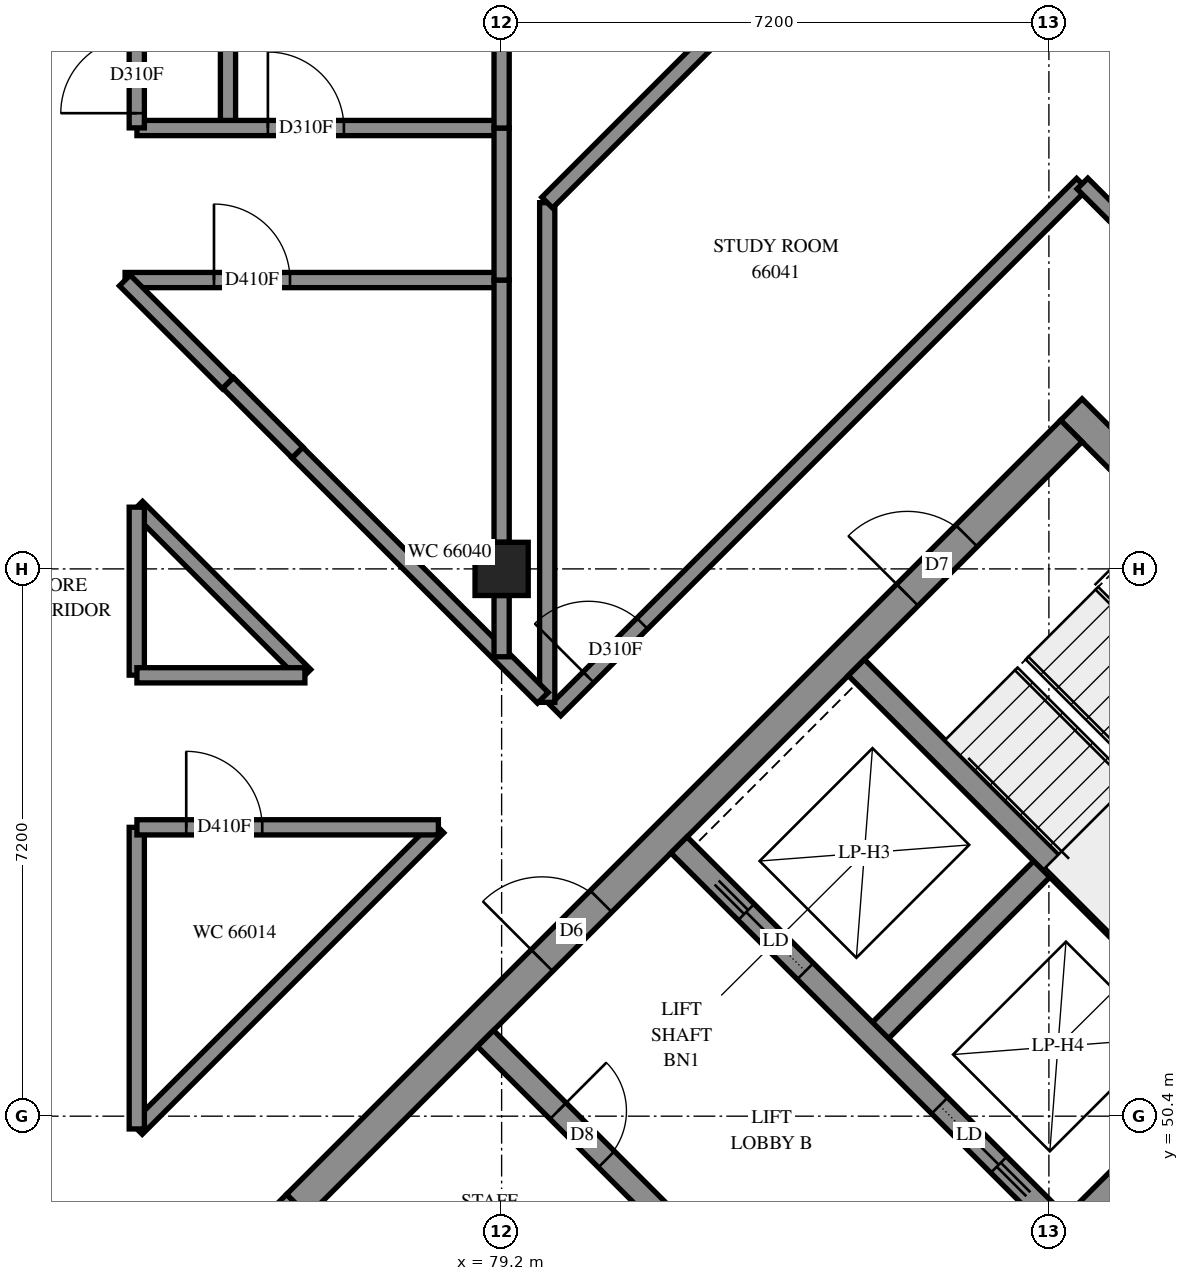
"""IFC4 building model, lengths in metres.
Left out: names, types, materials, properties, quantities, classifications, styles, units other than length and angle.
Written with IfcOpenShell. Run it as: python <this file> out.ifc"""

import sys

from ifc_helpers import new_model, si_unit, direction, frame, frame_2d, origin, origin_2d, place, context, subcontext, project, spatial, polyline, rectangle, outline, extrude, element, fill, save


model = new_model("IFC4")
c1 = context("Model", 3, precision=1e-05, world=origin(), true_north=direction((0.0, 1.0)))
c2 = subcontext(c1, "Body", "Model", "MODEL_VIEW")
j1 = project(units=[si_unit("LENGTHUNIT", "METRE"), si_unit("PLANEANGLEUNIT", "RADIAN")], contexts=[c1])
p1 = place(None, origin())
s1 = spatial("IfcSite", under=j1, at=p1, CompositionType="ELEMENT")
p2 = place(p1, origin())
s2 = spatial("IfcBuilding", under=s1, at=p2, CompositionType="ELEMENT")
p3 = place(p2, frame((0.0, 0.0, 243.8)))
s3 = spatial("IfcBuildingStorey", under=s2, at=p3, CompositionType="ELEMENT", Elevation=243.8)
p4 = place(p3, frame((79.2, 57.6, 0.0), z_axis=(0.0, 0.0, 1.0), x_axis=(1.0, 0.0, 0.0)))
e1 = element("IfcColumn", 1, at=p4, inside=s3, PredefinedType="COLUMN", context=c2, shape_type="SweptSolid", body=[
    extrude(rectangle(XDim=0.7, YDim=0.7, at=origin_2d()), origin(), (0.0, 0.0, 1.0), 3.1),
])
p5 = place(p3, frame((76.23, 49.231, -0.3), z_axis=(0.0, 0.0, 1.0), x_axis=(0.7071034917, -0.7071100706, 0.0)))
e2 = element("IfcWall", 2, at=p5, inside=s3, PredefinedType="SHEAR", context=c2, shape_type="SweptSolid", body=[
    extrude(rectangle(XDim=15.2, YDim=0.4, at=frame_2d((7.6, 0.0))), origin(), (0.0, 0.0, 1.0), 2.7),
])
p6 = place(p3, frame((86.695, 59.696, -0.3), z_axis=(0.0, 0.0, 1.0), x_axis=(0.7071100706, -0.7071034917, 0.0)))
e3 = element("IfcWall", 3, at=p6, inside=s3, PredefinedType="SHEAR", context=c2, shape_type="SweptSolid", body=[
    extrude(rectangle(XDim=15.2, YDim=0.4, at=frame_2d((7.6, 0.0))), origin(), (0.0, 0.0, 1.0), 2.7),
])
p7 = place(p6, frame((10.4, 0.0, 0.3)))
e4 = element("IfcOpeningElement", 4, at=p7, cuts=e3, PredefinedType="OPENING", context=c2, shape_type="SweptSolid", body=[
    extrude(rectangle(XDim=0.8, YDim=2.1, at=frame_2d((0.4, 1.05))), frame((0.0, 0.21, 0.0), z_axis=(0.0, -1.0, 0.0), x_axis=(1.0, 0.0, 0.0)), (0.0, 0.0, 1.0), 0.42),
])
p8 = place(p3, frame((76.513, 49.231, -0.3), z_axis=(0.0, 0.0, 1.0), x_axis=(0.7071067812, 0.7071067812, 0.0)))
e5 = element("IfcWall", 5, at=p8, inside=s3, PredefinedType="SHEAR", context=c2, shape_type="SweptSolid", body=[
    extrude(rectangle(XDim=14.4, YDim=0.4, at=frame_2d((7.2, 0.0))), origin(), (0.0, 0.0, 1.0), 2.7),
])
p9 = place(p8, frame((4.55, 0.0, 0.3)))
e6 = element("IfcOpeningElement", 6, at=p9, cuts=e5, PredefinedType="OPENING", context=c2, shape_type="SweptSolid", body=[
    extrude(rectangle(XDim=1.1, YDim=2.1, at=frame_2d((0.55, 1.05))), frame((0.0, 0.21, 0.0), z_axis=(0.0, -1.0, 0.0), x_axis=(1.0, 0.0, 0.0)), (0.0, 0.0, 1.0), 0.42),
])
p10 = place(p8, frame((11.35, 0.0, 0.3)))
e7 = element("IfcOpeningElement", 7, at=p10, cuts=e5, PredefinedType="OPENING", context=c2, shape_type="SweptSolid", body=[
    extrude(rectangle(XDim=1.1, YDim=2.1, at=frame_2d((0.55, 1.05))), frame((0.0, 0.21, 0.0), z_axis=(0.0, -1.0, 0.0), x_axis=(1.0, 0.0, 0.0)), (0.0, 0.0, 1.0), 0.42),
])
p11 = place(p3, frame((84.079, 51.423, 0.0), z_axis=(0.0, 0.0, 1.0), x_axis=(0.7071219326, 0.7070916295, 0.0)))
e8 = element("IfcWall", 8, at=p11, inside=s3, PredefinedType="SOLIDWALL", context=c2, shape_type="SweptSolid", body=[
    extrude(rectangle(XDim=3.3, YDim=0.3, at=frame_2d((1.65, 0.0))), origin(), (0.0, 0.0, 1.0), 3.1),
])
p12 = place(p3, frame((86.625, 48.878, 0.0), z_axis=(0.0, 0.0, 1.0), x_axis=(0.7071067812, 0.7071067812, 0.0)))
e9 = element("IfcWall", 9, at=p12, inside=s3, PredefinedType="SOLIDWALL", context=c2, shape_type="SweptSolid", body=[
    extrude(rectangle(XDim=3.3, YDim=0.3, at=frame_2d((1.65, 0.0))), origin(), (0.0, 0.0, 1.0), 3.1),
])
p13 = place(p3, frame((78.988, 51.423, 0.0), z_axis=(0.0, 0.0, 1.0), x_axis=(0.7071067812, -0.7071067812, 0.0)))
e10 = element("IfcWall", 10, at=p13, inside=s3, PredefinedType="SOLIDWALL", context=c2, shape_type="SweptSolid", body=[
    extrude(rectangle(XDim=14.4, YDim=0.3, at=frame_2d((7.2, 0.0))), origin(), (0.0, 0.0, 1.0), 3.1),
])
p14 = place(p13, frame((1.35, 0.0, 0.0)))
e11 = element("IfcOpeningElement", 11, at=p14, cuts=e10, PredefinedType="OPENING", context=c2, shape_type="SweptSolid", body=[
    extrude(rectangle(XDim=0.9, YDim=2.1, at=frame_2d((0.45, 1.05))), frame((0.0, 0.16, 0.0), z_axis=(0.0, -1.0, 0.0), x_axis=(1.0, 0.0, 0.0)), (0.0, 0.0, 1.0), 0.32),
])
p15 = place(p13, frame((4.95, 0.0, 0.0)))
e12 = element("IfcOpeningElement", 12, at=p15, cuts=e10, PredefinedType="OPENING", context=c2, shape_type="SweptSolid", body=[
    extrude(rectangle(XDim=0.9, YDim=2.1, at=frame_2d((0.45, 1.05))), frame((0.0, 0.16, 0.0), z_axis=(0.0, -1.0, 0.0), x_axis=(1.0, 0.0, 0.0)), (0.0, 0.0, 1.0), 0.32),
])
p16 = place(p13, frame((8.55, 0.0, 0.0)))
e13 = element("IfcOpeningElement", 13, at=p16, cuts=e10, PredefinedType="OPENING", context=c2, shape_type="SweptSolid", body=[
    extrude(rectangle(XDim=0.9, YDim=2.1, at=frame_2d((0.45, 1.05))), frame((0.0, 0.16, 0.0), z_axis=(0.0, -1.0, 0.0), x_axis=(1.0, 0.0, 0.0)), (0.0, 0.0, 1.0), 0.32),
])
p17 = place(p13, frame((12.05, 0.0, 0.0)))
e14 = element("IfcOpeningElement", 14, at=p17, cuts=e10, PredefinedType="OPENING", context=c2, shape_type="SweptSolid", body=[
    extrude(rectangle(XDim=1.1, YDim=2.1, at=frame_2d((0.55, 1.05))), frame((0.0, 0.16, 0.0), z_axis=(0.0, -1.0, 0.0), x_axis=(1.0, 0.0, 0.0)), (0.0, 0.0, 1.0), 0.32),
])
p18 = place(p3, frame((81.534, 53.969, 0.0), z_axis=(0.0, 0.0, 1.0), x_axis=(0.707103309, -0.7071102534, 0.0)))
e15 = element("IfcWall", 15, at=p18, inside=s3, PredefinedType="SOLIDWALL", context=c2, shape_type="SweptSolid", body=[
    extrude(rectangle(XDim=14.4, YDim=0.3, at=frame_2d((7.2, 0.0))), origin(), (0.0, 0.0, 1.0), 3.1),
])
p19 = place(p18, frame((8.55, 0.0, 0.0)))
e16 = element("IfcOpeningElement", 16, at=p19, cuts=e15, PredefinedType="OPENING", context=c2, shape_type="SweptSolid", body=[
    extrude(rectangle(XDim=0.9, YDim=2.1, at=frame_2d((0.45, 1.05))), frame((0.0, 0.16, 0.0), z_axis=(0.0, -1.0, 0.0), x_axis=(1.0, 0.0, 0.0)), (0.0, 0.0, 1.0), 0.32),
])
p20 = place(p18, frame((1.25, 0.0, 0.0)))
e17 = element("IfcOpeningElement", 17, at=p20, cuts=e15, PredefinedType="OPENING", context=c2, shape_type="SweptSolid", body=[
    extrude(rectangle(XDim=1.1, YDim=2.1, at=frame_2d((0.55, 1.05))), frame((0.0, 0.16, 0.0), z_axis=(0.0, -1.0, 0.0), x_axis=(1.0, 0.0, 0.0)), (0.0, 0.0, 1.0), 0.32),
])
p21 = place(p18, frame((4.85, 0.0, 0.0)))
e18 = element("IfcOpeningElement", 18, at=p21, cuts=e15, PredefinedType="OPENING", context=c2, shape_type="SweptSolid", body=[
    extrude(rectangle(XDim=1.1, YDim=2.1, at=frame_2d((0.55, 1.05))), frame((0.0, 0.16, 0.0), z_axis=(0.0, -1.0, 0.0), x_axis=(1.0, 0.0, 0.0)), (0.0, 0.0, 1.0), 0.32),
])
p22 = place(p18, frame((12.05, 0.0, 0.0)))
e19 = element("IfcOpeningElement", 19, at=p22, cuts=e15, PredefinedType="OPENING", context=c2, shape_type="SweptSolid", body=[
    extrude(rectangle(XDim=1.1, YDim=2.1, at=frame_2d((0.55, 1.05))), frame((0.0, 0.16, 0.0), z_axis=(0.0, -1.0, 0.0), x_axis=(1.0, 0.0, 0.0)), (0.0, 0.0, 1.0), 0.32),
])
p23 = place(p3, frame((83.867, 56.302, 0.0), z_axis=(0.0, 0.0, 1.0), x_axis=(0.7071137256, -0.7070998367, 0.0)))
e20 = element("IfcWall", 20, at=p23, inside=s3, PredefinedType="SOLIDWALL", context=c2, shape_type="SweptSolid", body=[
    extrude(rectangle(XDim=7.2, YDim=0.3, at=frame_2d((3.6, 0.0))), origin(), (0.0, 0.0, 1.0), 3.1),
])
p24 = place(p3, frame((88.896, 64.106, 0.0), z_axis=(0.0, 0.0, 1.0), x_axis=(-0.7677573222, 0.6407407387, 0.0)))
e21 = element("IfcWall", 21, at=p24, inside=s3, PredefinedType="SOLIDWALL", context=c2, shape_type="SweptSolid", body=[
    extrude(outline(polyline([(-0.02, -0.225), (3.32, -0.225), (3.361, 0.225), (0.02, 0.225), (-0.02, -0.225)])), origin(), (0.0, 0.0, 1.0), 3.1),
])
p25 = place(p24, frame((0.333, 0.0, 0.45)))
e22 = element("IfcOpeningElement", 22, at=p25, cuts=e21, PredefinedType="OPENING", context=c2, shape_type="SweptSolid", body=[
    extrude(rectangle(XDim=1.2, YDim=2.55, at=frame_2d((0.6, 1.275))), frame((0.0, 0.235, 0.0), z_axis=(0.0, -1.0, 0.0), x_axis=(1.0, 0.0, 0.0)), (0.0, 0.0, 1.0), 0.47),
])
p26 = place(p24, frame((1.793, 0.0, 0.45)))
e23 = element("IfcOpeningElement", 23, at=p26, cuts=e21, PredefinedType="OPENING", context=c2, shape_type="SweptSolid", body=[
    extrude(rectangle(XDim=1.2, YDim=2.55, at=frame_2d((0.6, 1.275))), frame((0.0, 0.235, 0.0), z_axis=(0.0, -1.0, 0.0), x_axis=(1.0, 0.0, 0.0)), (0.0, 0.0, 1.0), 0.47),
])
p27 = place(p3, frame((79.907, 55.739, 0.0), z_axis=(0.0, 0.0, 1.0), x_axis=(0.7071067812, 0.7071067812, 0.0)))
e24 = element("IfcWall", 24, at=p27, inside=s3, PredefinedType="PARTITIONING", context=c2, shape_type="SweptSolid", body=[
    extrude(rectangle(XDim=9.798, YDim=0.2, at=frame_2d((4.899, 0.0))), origin(), (0.0, 0.0, 1.0), 3.1),
])
p28 = place(p27, frame((0.616, 0.0, 0.0)))
e25 = element("IfcOpeningElement", 25, at=p28, cuts=e24, PredefinedType="OPENING", context=c2, shape_type="SweptSolid", body=[
    extrude(rectangle(XDim=1.0, YDim=2.1, at=frame_2d((0.5, 1.05))), frame((0.0, 0.11, 0.0), z_axis=(0.0, -1.0, 0.0), x_axis=(1.0, 0.0, 0.0)), (0.0, 0.0, 1.0), 0.22),
])
p29 = place(p3, frame((75.6, 63.4, 0.0), z_axis=(0.0, 0.0, 1.0), x_axis=(0.0, 1.0, 0.0)))
e26 = element("IfcWall", 26, at=p29, inside=s3, PredefinedType="PARTITIONING", context=c2, shape_type="SweptSolid", body=[
    extrude(rectangle(XDim=9.4, YDim=0.2, at=frame_2d((4.7, 0.0))), origin(), (0.0, 0.0, 1.0), 3.1),
])
p30 = place(p3, frame((79.8, 55.844, 0.0), z_axis=(0.0, 0.0, 1.0), x_axis=(0.0, 1.0, 0.0)))
e27 = element("IfcWall", 27, at=p30, inside=s3, PredefinedType="PARTITIONING", context=c2, shape_type="SweptSolid", body=[
    extrude(rectangle(XDim=6.574, YDim=0.2, at=frame_2d((3.287, 0.0))), origin(), (0.0, 0.0, 1.0), 3.1),
])
p31 = place(p3, frame((86.841, 62.669, 0.0), z_axis=(0.0, 0.0, 1.0), x_axis=(0.7071067812, -0.7071067812, 0.0)))
e28 = element("IfcWall", 28, at=p31, inside=s3, PredefinedType="PARTITIONING", context=c2, shape_type="SweptSolid", body=[
    extrude(rectangle(XDim=5.999, YDim=0.2, at=frame_2d((3.0, 0.0))), origin(), (0.0, 0.0, 1.0), 3.1),
])
p32 = place(p3, frame((79.799, 62.419, 0.0), z_axis=(0.0, 0.0, 1.0), x_axis=(0.7071067812, 0.7071067812, 0.0)))
e29 = element("IfcWall", 29, at=p32, inside=s3, PredefinedType="PARTITIONING", context=c2, shape_type="SweptSolid", body=[
    extrude(rectangle(XDim=5.858, YDim=0.2, at=frame_2d((2.929, 0.0))), origin(), (0.0, 0.0, 1.0), 3.1),
])
p33 = place(p3, frame((74.401, 50.233, 0.0), z_axis=(0.0, 0.0, 1.0), x_axis=(0.7071067812, 0.7071067812, 0.0)))
e30 = element("IfcWall", 30, at=p33, inside=s3, PredefinedType="PARTITIONING", context=c2, shape_type="SweptSolid", body=[
    extrude(rectangle(XDim=5.609, YDim=0.2, at=frame_2d((2.804, 0.0))), origin(), (0.0, 0.0, 1.0), 3.1),
])
p34 = place(p3, frame((74.246, 61.4, 0.0), z_axis=(0.0, 0.0, 1.0), x_axis=(1.0, 0.0, 0.0)))
e31 = element("IfcWall", 31, at=p34, inside=s3, PredefinedType="PARTITIONING", context=c2, shape_type="SweptSolid", body=[
    extrude(rectangle(XDim=4.954, YDim=0.2, at=frame_2d((2.477, 0.0))), origin(), (0.0, 0.0, 1.0), 3.1),
])
p35 = place(p34, frame((1.17, 0.0, 0.0)))
e32 = element("IfcOpeningElement", 32, at=p35, cuts=e31, PredefinedType="OPENING", context=c2, shape_type="SweptSolid", body=[
    extrude(rectangle(XDim=1.0, YDim=2.1, at=frame_2d((0.5, 1.05))), frame((0.0, 0.11, 0.0), z_axis=(0.0, -1.0, 0.0), x_axis=(1.0, 0.0, 0.0)), (0.0, 0.0, 1.0), 0.22),
])
p36 = place(p3, frame((74.402, 63.4, 0.0), z_axis=(0.0, 0.0, 1.0), x_axis=(1.0, 0.0, 0.0)))
e33 = element("IfcWall", 33, at=p36, inside=s3, PredefinedType="PARTITIONING", context=c2, shape_type="SweptSolid", body=[
    extrude(rectangle(XDim=4.798, YDim=0.2, at=frame_2d((2.399, 0.0))), origin(), (0.0, 0.0, 1.0), 3.1),
])
p37 = place(p36, frame((1.723, 0.0, 0.0)))
e34 = element("IfcOpeningElement", 34, at=p37, cuts=e33, PredefinedType="OPENING", context=c2, shape_type="SweptSolid", body=[
    extrude(rectangle(XDim=1.0, YDim=2.1, at=frame_2d((0.5, 1.05))), frame((0.0, 0.11, 0.0), z_axis=(0.0, -1.0, 0.0), x_axis=(1.0, 0.0, 0.0)), (0.0, 0.0, 1.0), 0.22),
])
p38 = place(p3, frame((76.513, 59.131, 0.0), z_axis=(0.0, 0.0, 1.0), x_axis=(0.7073586681, -0.7068548045, 0.0)))
e35 = element("IfcWall", 35, at=p38, inside=s3, PredefinedType="PARTITIONING", context=c2, shape_type="SweptSolid", body=[
    extrude(rectangle(XDim=4.565, YDim=0.2, at=frame_2d((2.282, 0.0))), origin(), (0.0, 0.0, 1.0), 3.1),
])
p39 = place(p3, frame((74.4, 50.232, 0.0), z_axis=(0.0, 0.0, 1.0), x_axis=(0.0, 1.0, 0.0)))
e36 = element("IfcWall", 36, at=p39, inside=s3, PredefinedType="PARTITIONING", context=c2, shape_type="SweptSolid", body=[
    extrude(rectangle(XDim=3.968, YDim=0.2, at=frame_2d((1.984, 0.0))), origin(), (0.0, 0.0, 1.0), 3.1),
])
p40 = place(p3, frame((74.402, 54.2, 0.0), z_axis=(0.0, 0.0, 1.0), x_axis=(1.0, 0.0, 0.0)))
e37 = element("IfcWall", 37, at=p40, inside=s3, PredefinedType="PARTITIONING", context=c2, shape_type="SweptSolid", body=[
    extrude(rectangle(XDim=3.966, YDim=0.2, at=frame_2d((1.983, 0.0))), origin(), (0.0, 0.0, 1.0), 3.1),
])
p41 = place(p40, frame((0.649, 0.0, 0.0)))
e38 = element("IfcOpeningElement", 38, at=p41, cuts=e37, PredefinedType="OPENING", context=c2, shape_type="SweptSolid", body=[
    extrude(rectangle(XDim=1.0, YDim=2.1, at=frame_2d((0.5, 1.05))), frame((0.0, 0.11, 0.0), z_axis=(0.0, -1.0, 0.0), x_axis=(1.0, 0.0, 0.0)), (0.0, 0.0, 1.0), 0.22),
])
p42 = place(p3, frame((74.4, 63.402, 0.0), z_axis=(0.0, 0.0, 1.0), x_axis=(0.0, 1.0, 0.0)))
e39 = element("IfcWall", 39, at=p42, inside=s3, PredefinedType="PARTITIONING", context=c2, shape_type="SweptSolid", body=[
    extrude(rectangle(XDim=3.798, YDim=0.2, at=frame_2d((1.899, 0.0))), origin(), (0.0, 0.0, 1.0), 3.1),
])
p43 = place(p42, frame((0.193, 0.0, 0.0)))
e40 = element("IfcOpeningElement", 40, at=p43, cuts=e39, PredefinedType="OPENING", context=c2, shape_type="SweptSolid", body=[
    extrude(rectangle(XDim=1.0, YDim=2.1, at=frame_2d((0.5, 1.05))), frame((0.0, 0.11, 0.0), z_axis=(0.0, -1.0, 0.0), x_axis=(1.0, 0.0, 0.0)), (0.0, 0.0, 1.0), 0.22),
])
p44 = place(p3, frame((79.2, 57.95, 0.0), z_axis=(0.0, 0.0, 1.0), x_axis=(0.0, 1.0, 0.0)))
e41 = element("IfcWall", 41, at=p44, inside=s3, PredefinedType="PARTITIONING", context=c2, shape_type="SweptSolid", body=[
    extrude(rectangle(XDim=3.45, YDim=0.2, at=frame_2d((1.725, 0.0))), origin(), (0.0, 0.0, 1.0), 3.1),
])
p45 = place(p3, frame((74.406, 58.417, 0.0), z_axis=(0.0, 0.0, 1.0), x_axis=(0.7071067812, -0.7071067812, 0.0)))
e42 = element("IfcWall", 42, at=p45, inside=s3, PredefinedType="PARTITIONING", context=c2, shape_type="SweptSolid", body=[
    extrude(rectangle(XDim=3.128, YDim=0.2, at=frame_2d((1.564, 0.0))), origin(), (0.0, 0.0, 1.0), 3.1),
])
for number, where, z_axis, x_axis in (
    (43, (74.4, 56.202, 0.0), (0.0, 0.0, 1.0), (0.0, 1.0, 0.0)),
    (44, (74.402, 56.2, 0.0), (0.0, 0.0, 1.0), (1.0, 0.0, 0.0)),
):
    element("IfcWall", number, at=place(p3, frame(where, z_axis=z_axis, x_axis=x_axis)), inside=s3, PredefinedType="PARTITIONING", context=c2, shape_type="SweptSolid", body=[
        extrude(rectangle(XDim=2.21, YDim=0.2, at=frame_2d((1.105, 0.0))), origin(), (0.0, 0.0, 1.0), 3.1),
    ])
p46 = place(p3, frame((79.2, 61.4, 0.0), z_axis=(0.0, 0.0, 1.0), x_axis=(0.0, 1.0, 0.0)))
e45 = element("IfcWall", 45, at=p46, inside=s3, PredefinedType="PARTITIONING", context=c2, shape_type="SweptSolid", body=[
    extrude(rectangle(XDim=2.0, YDim=0.2, at=frame_2d((1.0, 0.0))), origin(), (0.0, 0.0, 1.0), 3.1),
])
p47 = place(p3, frame((74.243, 61.395, 0.0), z_axis=(0.0, 0.0, 1.0), x_axis=(0.7071067812, -0.7071067812, 0.0)))
e46 = element("IfcWall", 46, at=p47, inside=s3, PredefinedType="PARTITIONING", context=c2, shape_type="SweptSolid", body=[
    extrude(rectangle(XDim=1.915, YDim=0.2, at=frame_2d((0.957, 0.0))), origin(), (0.0, 0.0, 1.0), 3.1),
])
p48 = place(p3, frame((75.602, 60.046, 0.0), z_axis=(0.0, 0.0, 1.0), x_axis=(0.7063318703, -0.7078808437, 0.0)))
e47 = element("IfcWall", 47, at=p48, inside=s3, PredefinedType="PARTITIONING", context=c2, shape_type="SweptSolid", body=[
    extrude(rectangle(XDim=1.291, YDim=0.2, at=frame_2d((0.646, 0.0))), origin(), (0.0, 0.0, 1.0), 3.1),
])
p49 = place(p3, frame((79.2, 63.4, 0.0), z_axis=(0.0, 0.0, 1.0), x_axis=(0.0, 1.0, 0.0)))
e48 = element("IfcWall", 48, at=p49, inside=s3, PredefinedType="PARTITIONING", context=c2, shape_type="SweptSolid", body=[
    extrude(rectangle(XDim=1.05, YDim=0.2, at=frame_2d((0.525, 0.0))), origin(), (0.0, 0.0, 1.0), 3.1),
])
p50 = place(p3, frame((79.2, 56.444, 0.0), z_axis=(0.0, 0.0, 1.0), x_axis=(0.0, 1.0, 0.0)))
e49 = element("IfcWall", 49, at=p50, inside=s3, PredefinedType="PARTITIONING", context=c2, shape_type="SweptSolid", body=[
    extrude(rectangle(XDim=0.806, YDim=0.2, at=frame_2d((0.403, 0.0))), origin(), (0.0, 0.0, 1.0), 3.1),
])
p51 = place(p9, origin())
e50 = element("IfcDoor", 50, at=p51, inside=s3, OperationType="DOUBLE_DOOR_SINGLE_SWING", PredefinedType="DOOR", context=c2, shape_type="SweptSolid", body=[
    extrude(rectangle(XDim=1.1, YDim=2.1, at=frame_2d((0.55, 1.05))), frame((0.0, 0.025, 0.0), z_axis=(0.0, -1.0, 0.0), x_axis=(1.0, 0.0, 0.0)), (0.0, 0.0, 1.0), 0.05),
])
fill(e6, e50)
p52 = place(p10, origin())
e51 = element("IfcDoor", 51, at=p52, inside=s3, OperationType="SINGLE_SWING_LEFT", PredefinedType="DOOR", context=c2, shape_type="SweptSolid", body=[
    extrude(rectangle(XDim=1.1, YDim=2.1, at=frame_2d((0.55, 1.05))), frame((0.0, 0.025, 0.0), z_axis=(0.0, -1.0, 0.0), x_axis=(1.0, 0.0, 0.0)), (0.0, 0.0, 1.0), 0.05),
])
fill(e7, e51)
p53 = place(p14, origin())
e52 = element("IfcDoor", 52, at=p53, inside=s3, OperationType="SINGLE_SWING_LEFT", PredefinedType="DOOR", context=c2, shape_type="SweptSolid", body=[
    extrude(rectangle(XDim=0.9, YDim=2.1, at=frame_2d((0.45, 1.05))), frame((0.0, 0.025, 0.0), z_axis=(0.0, -1.0, 0.0), x_axis=(1.0, 0.0, 0.0)), (0.0, 0.0, 1.0), 0.05),
])
fill(e11, e52)
p54 = place(p20, origin())
e53 = element("IfcDoor", 53, at=p54, inside=s3, OperationType="SLIDING_TO_LEFT", PredefinedType="DOOR", context=c2, shape_type="SweptSolid", body=[
    extrude(rectangle(XDim=1.1, YDim=2.1, at=frame_2d((0.55, 1.05))), frame((0.0, 0.025, 0.0), z_axis=(0.0, -1.0, 0.0), x_axis=(1.0, 0.0, 0.0)), (0.0, 0.0, 1.0), 0.05),
])
fill(e17, e53)
p55 = place(p21, origin())
e54 = element("IfcDoor", 54, at=p55, inside=s3, OperationType="SLIDING_TO_RIGHT", PredefinedType="DOOR", context=c2, shape_type="SweptSolid", body=[
    extrude(rectangle(XDim=1.1, YDim=2.1, at=frame_2d((0.55, 1.05))), frame((0.0, 0.025, 0.0), z_axis=(0.0, -1.0, 0.0), x_axis=(1.0, 0.0, 0.0)), (0.0, 0.0, 1.0), 0.05),
])
fill(e18, e54)
p56 = place(p41, origin())
e55 = element("IfcDoor", 55, at=p56, inside=s3, OperationType="SINGLE_SWING_RIGHT", PredefinedType="DOOR", context=c2, shape_type="SweptSolid", body=[
    extrude(rectangle(XDim=1.0, YDim=2.1, at=frame_2d((0.5, 1.05))), frame((0.0, 0.025, 0.0), z_axis=(0.0, -1.0, 0.0), x_axis=(1.0, 0.0, 0.0)), (0.0, 0.0, 1.0), 0.05),
])
fill(e38, e55)
p57 = place(p43, origin())
e56 = element("IfcDoor", 56, at=p57, inside=s3, OperationType="SINGLE_SWING_RIGHT", PredefinedType="DOOR", context=c2, shape_type="SweptSolid", body=[
    extrude(rectangle(XDim=1.0, YDim=2.1, at=frame_2d((0.5, 1.05))), frame((0.0, 0.025, 0.0), z_axis=(0.0, -1.0, 0.0), x_axis=(1.0, 0.0, 0.0)), (0.0, 0.0, 1.0), 0.05),
])
fill(e40, e56)
p58 = place(p37, origin())
e57 = element("IfcDoor", 57, at=p58, inside=s3, OperationType="SINGLE_SWING_LEFT", PredefinedType="DOOR", context=c2, shape_type="SweptSolid", body=[
    extrude(rectangle(XDim=1.0, YDim=2.1, at=frame_2d((0.5, 1.05))), frame((0.0, 0.025, 0.0), z_axis=(0.0, -1.0, 0.0), x_axis=(1.0, 0.0, 0.0)), (0.0, 0.0, 1.0), 0.05),
])
fill(e34, e57)
p59 = place(p35, origin())
e58 = element("IfcDoor", 58, at=p59, inside=s3, OperationType="SINGLE_SWING_RIGHT", PredefinedType="DOOR", context=c2, shape_type="SweptSolid", body=[
    extrude(rectangle(XDim=1.0, YDim=2.1, at=frame_2d((0.5, 1.05))), frame((0.0, 0.025, 0.0), z_axis=(0.0, -1.0, 0.0), x_axis=(1.0, 0.0, 0.0)), (0.0, 0.0, 1.0), 0.05),
])
fill(e32, e58)
p60 = place(p28, origin())
e59 = element("IfcDoor", 59, at=p60, inside=s3, OperationType="SINGLE_SWING_LEFT", PredefinedType="DOOR", context=c2, shape_type="SweptSolid", body=[
    extrude(rectangle(XDim=1.0, YDim=2.1, at=frame_2d((0.5, 1.05))), frame((0.0, 0.025, 0.0), z_axis=(0.0, -1.0, 0.0), x_axis=(1.0, 0.0, 0.0)), (0.0, 0.0, 1.0), 0.05),
])
fill(e25, e59)
save(model, sys.argv[1])
